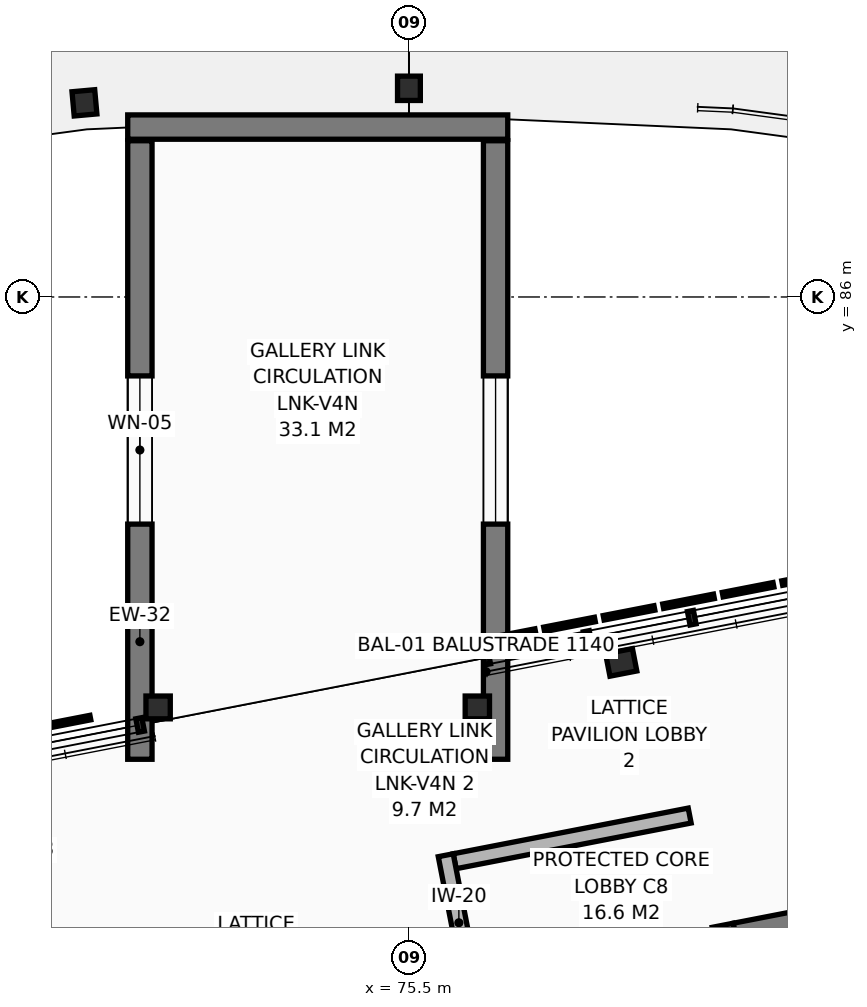
"""IFC4 building model, lengths in metres.
Left out: names, types, materials, properties, quantities, classifications, styles, units other than length and angle.
Written with IfcOpenShell. Run it as: python <this file> out.ifc"""

import sys

from ifc_helpers import new_model, si_unit, direction, frame, frame_2d, origin, origin_2d, place, context, subcontext, project, spatial, rectangle, i_section, extrude, element, fill, save


model = new_model("IFC4")
c1 = context("Model", 3, precision=1e-05, world=origin(), true_north=direction((0.0, 1.0)))
c2 = subcontext(c1, "Body", "Model", "MODEL_VIEW")
j1 = project(units=[si_unit("LENGTHUNIT", "METRE"), si_unit("PLANEANGLEUNIT", "RADIAN")], contexts=[c1])
p1 = place(None, origin())
s1 = spatial("IfcSite", under=j1, at=p1, CompositionType="ELEMENT")
p2 = place(p1, origin())
s2 = spatial("IfcBuilding", under=s1, at=p2, CompositionType="ELEMENT")
p3 = place(p2, frame((0.0, 0.0, 9.52)))
s3 = spatial("IfcBuildingStorey", under=s2, at=p3, CompositionType="ELEMENT", Elevation=9.52)
for number, where, z_axis, x_axis in (
    (1, (75.5, 88.745, 0.0), (0.0, 0.0, 1.0), (0.0, -1.0, 0.0)),
    (2, (71.231, 88.554, 0.0), (0.0, 0.0, 1.0), (0.089, -0.996, 0.0)),
):
    element("IfcColumn", number, at=place(p3, frame(where, z_axis=z_axis, x_axis=x_axis)), inside=s3, PredefinedType="COLUMN", context=c2, shape_type="SweptSolid", body=[
        extrude(i_section(OverallWidth=0.3, OverallDepth=0.32, WebThickness=0.011, FlangeThickness=0.021, FilletRadius=0.027, at=origin_2d()), origin(), (0.0, 0.0, 1.0), 4.16),
    ])
p4 = place(p3, frame((78.293, 81.193, 0.0), z_axis=(0.0, 0.0, 1.0), x_axis=(0.981627183448, 0.190808995377, 0.0)))
e3 = element("IfcColumn", 3, at=p4, inside=s3, PredefinedType="COLUMN", context=c2, shape_type="SweptSolid", body=[
    extrude(i_section(OverallWidth=0.3, OverallDepth=0.36, WebThickness=0.012, FlangeThickness=0.022, FilletRadius=0.027, at=origin_2d()), origin(), (0.0, 0.0, 1.0), 4.16),
])
for number, where, z_axis, x_axis in (
    (4, (72.2, 80.6, 0.0), (0.0, 0.0, 1.0), (1.0, 0.0, 0.0)),
    (5, (76.4, 80.6, 0.0), (0.0, 0.0, 1.0), (1.0, 0.0, 0.0)),
):
    element("IfcColumn", number, at=place(p3, frame(where, z_axis=z_axis, x_axis=x_axis)), inside=s3, PredefinedType="COLUMN", context=c2, shape_type="SweptSolid", body=[
        extrude(i_section(OverallWidth=0.3, OverallDepth=0.32, WebThickness=0.011, FlangeThickness=0.021, FilletRadius=0.027, at=origin_2d()), origin(), (0.0, 0.0, 1.0), 4.16),
    ])
p5 = place(p3, frame((71.96, 79.918, 0.0), z_axis=(0.0, 0.0, 1.0), x_axis=(0.0, 1.0, 0.0)))
e6 = element("IfcWall", 6, at=p5, inside=s3, PredefinedType="SOLIDWALL", context=c2, shape_type="SweptSolid", body=[
    extrude(rectangle(XDim=8.137, YDim=0.32, at=frame_2d((4.069, 0.0))), origin(), (0.0, 0.0, 1.0), 3.91),
])
p6 = place(p5, frame((3.094, 0.0, 1.12)))
e7 = element("IfcOpeningElement", 7, at=p6, cuts=e6, PredefinedType="OPENING", context=c2, shape_type="SweptSolid", body=[
    extrude(rectangle(XDim=1.95, YDim=1.5, at=frame_2d((0.975, 0.75))), frame((0.0, 0.17, 0.0), z_axis=(0.0, -1.0, 0.0), x_axis=(1.0, 0.0, 0.0)), (0.0, 0.0, 1.0), 0.34),
])
p7 = place(p3, frame((76.64, 88.055, 0.0), z_axis=(0.0, 0.0, 1.0), x_axis=(0.0, -1.0, 0.0)))
e8 = element("IfcWall", 8, at=p7, inside=s3, PredefinedType="SOLIDWALL", context=c2, shape_type="SweptSolid", body=[
    extrude(rectangle(XDim=8.137, YDim=0.32, at=frame_2d((4.069, 0.0))), origin(), (0.0, 0.0, 1.0), 3.91),
])
p8 = place(p7, frame((3.094, 0.0, 1.12)))
e9 = element("IfcOpeningElement", 9, at=p8, cuts=e8, PredefinedType="OPENING", context=c2, shape_type="SweptSolid", body=[
    extrude(rectangle(XDim=1.95, YDim=1.5, at=frame_2d((0.975, 0.75))), frame((0.0, 0.17, 0.0), z_axis=(0.0, -1.0, 0.0), x_axis=(1.0, 0.0, 0.0)), (0.0, 0.0, 1.0), 0.34),
])
p9 = place(p3, frame((71.8, 88.235, 0.0), z_axis=(0.0, 0.0, 1.0), x_axis=(1.0, 0.0, 0.0)))
e10 = element("IfcWall", 10, at=p9, inside=s3, PredefinedType="SOLIDWALL", context=c2, shape_type="SweptSolid", body=[
    extrude(rectangle(XDim=5.0, YDim=0.32, at=frame_2d((2.5, 0.0))), origin(), (0.0, 0.0, 1.0), 3.91),
])
p10 = place(p3, frame((87.35, 79.092, 0.0), z_axis=(0.0, 0.0, 1.0), x_axis=(-0.98162132967, -0.190839107987, 0.0)))
e11 = element("IfcWall", 11, at=p10, inside=s3, PredefinedType="SHEAR", context=c2, shape_type="SweptSolid", body=[
    extrude(rectangle(XDim=7.7, YDim=0.28, at=frame_2d((3.85, 0.0))), origin(), (0.0, 0.0, 1.0), 3.96),
])
p11 = place(p3, frame((79.627, 77.734, 0.0), z_axis=(0.0, 0.0, 1.0), x_axis=(0.190812213529, -0.981626557897, 0.0)))
e12 = element("IfcWall", 12, at=p11, inside=s3, PredefinedType="SHEAR", context=c2, shape_type="SweptSolid", body=[
    extrude(rectangle(XDim=3.64, YDim=0.28, at=frame_2d((1.82, 0.0))), origin(), (0.0, 0.0, 1.0), 3.96),
])
p12 = place(p11, frame((1.2, 0.0, 0.0)))
e13 = element("IfcOpeningElement", 13, at=p12, cuts=e12, PredefinedType="OPENING", context=c2, shape_type="SweptSolid", body=[
    extrude(rectangle(XDim=1.32, YDim=2.12, at=frame_2d((0.66, 1.06))), frame((0.0, 0.15, 0.0), z_axis=(0.0, -1.0, 0.0), x_axis=(1.0, 0.0, 0.0)), (0.0, 0.0, 1.0), 0.3),
])
p13 = place(p3, frame((79.194, 79.177, 0.0), z_axis=(0.0, 0.0, 1.0), x_axis=(-0.981624666284, -0.190821944603, 0.0)))
e14 = element("IfcWall", 14, at=p13, inside=s3, PredefinedType="PARTITIONING", context=c2, shape_type="SweptSolid", body=[
    extrude(rectangle(XDim=3.15, YDim=0.2, at=frame_2d((1.575, 0.0))), origin(), (0.0, 0.0, 1.0), 3.55),
])
p14 = place(p3, frame((76.958, 73.649, 0.0), z_axis=(0.0, 0.0, 1.0), x_axis=(-0.190810719655, 0.98162684828, 0.0)))
e15 = element("IfcWall", 15, at=p14, inside=s3, PredefinedType="PARTITIONING", context=c2, shape_type="SweptSolid", body=[
    extrude(rectangle(XDim=5.1, YDim=0.2, at=frame_2d((2.55, 0.0))), origin(), (0.0, 0.0, 1.0), 3.61),
])
p15 = place(p14, frame((1.81, 0.0, 0.0)))
e16 = element("IfcOpeningElement", 16, at=p15, cuts=e15, PredefinedType="OPENING", context=c2, shape_type="SweptSolid", body=[
    extrude(rectangle(XDim=1.48, YDim=2.15, at=frame_2d((0.74, 1.075))), frame((0.0, 0.11, 0.0), z_axis=(0.0, -1.0, 0.0), x_axis=(1.0, 0.0, 0.0)), (0.0, 0.0, 1.0), 0.22),
])
p16 = place(p3, frame((71.651, 72.23, 0.0), z_axis=(0.0, 0.0, 1.0), x_axis=(-0.190786732806, 0.981631510591, 0.0)))
e17 = element("IfcWall", 17, at=p16, inside=s3, PredefinedType="PARTITIONING", context=c2, shape_type="SweptSolid", body=[
    extrude(rectangle(XDim=7.88, YDim=0.18, at=frame_2d((3.94, 0.0))), origin(), (0.0, 0.0, 1.0), 3.55),
])
p17 = place(p16, frame((3.23, 0.0, 0.0)))
e18 = element("IfcOpeningElement", 18, at=p17, cuts=e17, PredefinedType="OPENING", context=c2, shape_type="SweptSolid", body=[
    extrude(rectangle(XDim=1.42, YDim=2.18, at=frame_2d((0.71, 1.09))), frame((0.0, 0.1, 0.0), z_axis=(0.0, -1.0, 0.0), x_axis=(1.0, 0.0, 0.0)), (0.0, 0.0, 1.0), 0.2),
])
p18 = place(p6, origin())
e19 = element("IfcWindow", 19, at=p18, inside=s3, PartitioningType="SINGLE_PANEL", PredefinedType="WINDOW", context=c2, shape_type="SweptSolid", body=[
    extrude(rectangle(XDim=1.95, YDim=1.5, at=frame_2d((0.975, 0.75))), frame((0.0, 0.03, 0.0), z_axis=(0.0, -1.0, 0.0), x_axis=(1.0, 0.0, 0.0)), (0.0, 0.0, 1.0), 0.06),
])
fill(e7, e19)
p19 = place(p8, origin())
e20 = element("IfcWindow", 20, at=p19, inside=s3, PartitioningType="SINGLE_PANEL", PredefinedType="WINDOW", context=c2, shape_type="SweptSolid", body=[
    extrude(rectangle(XDim=1.95, YDim=1.5, at=frame_2d((0.975, 0.75))), frame((0.0, 0.03, 0.0), z_axis=(0.0, -1.0, 0.0), x_axis=(1.0, 0.0, 0.0)), (0.0, 0.0, 1.0), 0.06),
])
fill(e9, e20)
save(model, sys.argv[1])
